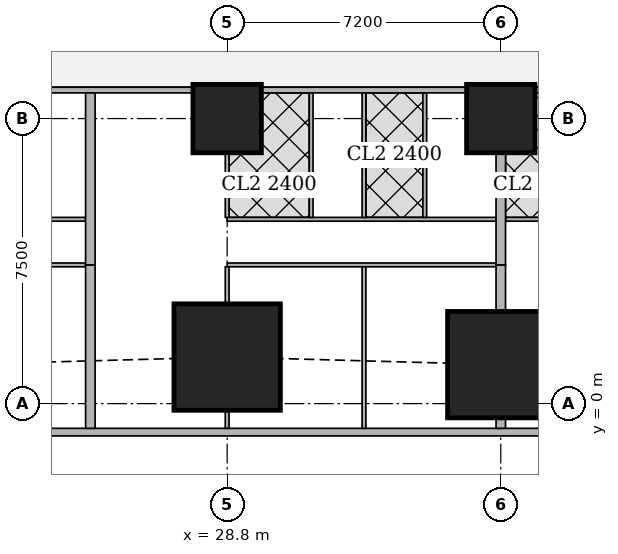
"""IFC4 building model, lengths in metres.
Left out: names, types, materials, properties, quantities, classifications, styles, units other than length and angle.
Written with IfcOpenShell. Run it as: python <this file> out.ifc"""

import sys

from ifc_helpers import new_model, si_unit, direction, frame, frame_2d, origin, origin_2d, place, context, subcontext, project, spatial, rectangle, extrude, element, fill, save


model = new_model("IFC4")
c1 = context("Model", 3, precision=1e-05, world=origin(), true_north=direction((0.0, 1.0)))
c2 = subcontext(c1, "Body", "Model", "MODEL_VIEW")
j1 = project(units=[si_unit("LENGTHUNIT", "METRE"), si_unit("PLANEANGLEUNIT", "RADIAN")], contexts=[c1])
p1 = place(None, origin())
s1 = spatial("IfcSite", under=j1, at=p1, CompositionType="ELEMENT")
p2 = place(p1, origin())
s2 = spatial("IfcBuilding", under=s1, at=p2, CompositionType="ELEMENT")
p3 = place(p2, frame((0.0, 0.0, 31.25)))
s3 = spatial("IfcBuildingStorey", under=s2, at=p3, CompositionType="ELEMENT", Elevation=31.25)
for number, where, z_axis, x_axis in (
    (1, (28.8, 1.225, 0.0), (0.0, 0.0, 1.0), (1.0, 0.0, 0.0)),
    (2, (36.0, 1.025, 0.0), (0.0, 0.0, 1.0), (1.0, 0.0, 0.0)),
):
    element("IfcColumn", number, at=place(p3, frame(where, z_axis=z_axis, x_axis=x_axis)), inside=s3, PredefinedType="COLUMN", context=c2, shape_type="SweptSolid", body=[
        extrude(rectangle(XDim=2.8, YDim=2.8, at=origin_2d()), origin(), (0.0, 0.0, 1.0), 3.75),
    ])
for number, where, z_axis, x_axis in (
    (3, (28.8, 7.5, 0.0), (0.0, 0.0, 1.0), (1.0, 0.0, 0.0)),
    (4, (36.0, 7.5, 0.0), (0.0, 0.0, 1.0), (1.0, 0.0, 0.0)),
):
    element("IfcColumn", number, at=place(p3, frame(where, z_axis=z_axis, x_axis=x_axis)), inside=s3, PredefinedType="COLUMN", context=c2, shape_type="SweptSolid", body=[
        extrude(rectangle(XDim=1.8, YDim=1.8, at=origin_2d()), origin(), (0.0, 0.0, 1.0), 3.75),
    ])
p4 = place(p3, frame((2.163, -0.75, 0.0), z_axis=(0.0, 0.0, 1.0), x_axis=(1.0, 0.0, 0.0)))
e5 = element("IfcWall", 5, at=p4, inside=s3, PredefinedType="SOLIDWALL", context=c2, shape_type="SweptSolid", body=[
    extrude(rectangle(XDim=45.628, YDim=0.2, at=frame_2d((22.814, 0.0))), origin(), (0.0, 0.0, 1.0), 3.5),
])
p5 = place(p4, frame((9.537, 0.0, 0.9)))
e6 = element("IfcOpeningElement", 6, at=p5, cuts=e5, PredefinedType="OPENING", context=c2, shape_type="SweptSolid", body=[
    extrude(rectangle(XDim=1.8, YDim=1.5, at=frame_2d((0.9, 0.75))), frame((0.0, 0.11, 0.0), z_axis=(0.0, -1.0, 0.0), x_axis=(1.0, 0.0, 0.0)), (0.0, 0.0, 1.0), 0.22),
])
p6 = place(p4, frame((13.137, 0.0, 0.9)))
e7 = element("IfcOpeningElement", 7, at=p6, cuts=e5, PredefinedType="OPENING", context=c2, shape_type="SweptSolid", body=[
    extrude(rectangle(XDim=1.8, YDim=1.5, at=frame_2d((0.9, 0.75))), frame((0.0, 0.11, 0.0), z_axis=(0.0, -1.0, 0.0), x_axis=(1.0, 0.0, 0.0)), (0.0, 0.0, 1.0), 0.22),
])
p7 = place(p4, frame((16.737, 0.0, 0.9)))
e8 = element("IfcOpeningElement", 8, at=p7, cuts=e5, PredefinedType="OPENING", context=c2, shape_type="SweptSolid", body=[
    extrude(rectangle(XDim=1.8, YDim=1.5, at=frame_2d((0.9, 0.75))), frame((0.0, 0.11, 0.0), z_axis=(0.0, -1.0, 0.0), x_axis=(1.0, 0.0, 0.0)), (0.0, 0.0, 1.0), 0.22),
])
p8 = place(p4, frame((20.337, 0.0, 0.9)))
e9 = element("IfcOpeningElement", 9, at=p8, cuts=e5, PredefinedType="OPENING", context=c2, shape_type="SweptSolid", body=[
    extrude(rectangle(XDim=1.8, YDim=1.5, at=frame_2d((0.9, 0.75))), frame((0.0, 0.11, 0.0), z_axis=(0.0, -1.0, 0.0), x_axis=(1.0, 0.0, 0.0)), (0.0, 0.0, 1.0), 0.22),
])
p9 = place(p4, frame((23.937, 0.0, 0.9)))
e10 = element("IfcOpeningElement", 10, at=p9, cuts=e5, PredefinedType="OPENING", context=c2, shape_type="SweptSolid", body=[
    extrude(rectangle(XDim=1.8, YDim=1.5, at=frame_2d((0.9, 0.75))), frame((0.0, 0.11, 0.0), z_axis=(0.0, -1.0, 0.0), x_axis=(1.0, 0.0, 0.0)), (0.0, 0.0, 1.0), 0.22),
])
p10 = place(p4, frame((27.537, 0.0, 0.9)))
e11 = element("IfcOpeningElement", 11, at=p10, cuts=e5, PredefinedType="OPENING", context=c2, shape_type="SweptSolid", body=[
    extrude(rectangle(XDim=1.8, YDim=1.5, at=frame_2d((0.9, 0.75))), frame((0.0, 0.11, 0.0), z_axis=(0.0, -1.0, 0.0), x_axis=(1.0, 0.0, 0.0)), (0.0, 0.0, 1.0), 0.22),
])
p11 = place(p4, frame((31.137, 0.0, 0.9)))
e12 = element("IfcOpeningElement", 12, at=p11, cuts=e5, PredefinedType="OPENING", context=c2, shape_type="SweptSolid", body=[
    extrude(rectangle(XDim=1.8, YDim=1.5, at=frame_2d((0.9, 0.75))), frame((0.0, 0.11, 0.0), z_axis=(0.0, -1.0, 0.0), x_axis=(1.0, 0.0, 0.0)), (0.0, 0.0, 1.0), 0.22),
])
p12 = place(p4, frame((34.737, 0.0, 0.9)))
e13 = element("IfcOpeningElement", 13, at=p12, cuts=e5, PredefinedType="OPENING", context=c2, shape_type="SweptSolid", body=[
    extrude(rectangle(XDim=1.8, YDim=1.5, at=frame_2d((0.9, 0.75))), frame((0.0, 0.11, 0.0), z_axis=(0.0, -1.0, 0.0), x_axis=(1.0, 0.0, 0.0)), (0.0, 0.0, 1.0), 0.22),
])
p13 = place(p3, frame((40.355, 8.25, 0.0), z_axis=(0.0, 0.0, 1.0), x_axis=(-1.0, 0.0, 0.0)))
e14 = element("IfcWall", 14, at=p13, inside=s3, PredefinedType="SOLIDWALL", context=c2, shape_type="SweptSolid", body=[
    extrude(rectangle(XDim=3.454, YDim=0.15, at=frame_2d((1.727, 0.0))), origin(), (0.0, 0.0, 1.0), 3.5),
])
p14 = place(p13, frame((0.15, 0.0, 0.0)))
e15 = element("IfcOpeningElement", 15, at=p14, cuts=e14, PredefinedType="OPENING", context=c2, shape_type="SweptSolid", body=[
    extrude(rectangle(XDim=1.0, YDim=2.1, at=frame_2d((0.5, 1.05))), frame((0.0, 0.085, 0.0), z_axis=(0.0, -1.0, 0.0), x_axis=(1.0, 0.0, 0.0)), (0.0, 0.0, 1.0), 0.17),
])
p15 = place(p3, frame((35.099, 8.25, 0.0), z_axis=(0.0, 0.0, 1.0), x_axis=(-1.0, 0.0, 0.0)))
e16 = element("IfcWall", 16, at=p15, inside=s3, PredefinedType="SOLIDWALL", context=c2, shape_type="SweptSolid", body=[
    extrude(rectangle(XDim=5.398, YDim=0.15, at=frame_2d((2.699, 0.0))), origin(), (0.0, 0.0, 1.0), 3.5),
])
p16 = place(p3, frame((27.899, 8.25, 0.0), z_axis=(0.0, 0.0, 1.0), x_axis=(-1.0, 0.0, 0.0)))
e17 = element("IfcWall", 17, at=p16, inside=s3, PredefinedType="SOLIDWALL", context=c2, shape_type="SweptSolid", body=[
    extrude(rectangle(XDim=5.398, YDim=0.15, at=frame_2d((2.699, 0.0))), origin(), (0.0, 0.0, 1.0), 3.5),
])
p17 = place(p16, frame((0.799, 0.0, 0.0)))
e18 = element("IfcOpeningElement", 18, at=p17, cuts=e17, PredefinedType="OPENING", context=c2, shape_type="SweptSolid", body=[
    extrude(rectangle(XDim=1.0, YDim=2.1, at=frame_2d((0.5, 1.05))), frame((0.0, 0.085, 0.0), z_axis=(0.0, -1.0, 0.0), x_axis=(1.0, 0.0, 0.0)), (0.0, 0.0, 1.0), 0.17),
])
p18 = place(p3, frame((35.094, 36.585, 0.0), z_axis=(0.0, 0.0, 1.0), x_axis=(0.185588860311, -0.982627485331, 0.0)))
e19 = element("IfcWall", 19, at=p18, inside=s3, PredefinedType="SOLIDWALL", context=c2, shape_type="SweptSolid", body=[
    extrude(rectangle(XDim=34.797, YDim=0.15, at=frame_2d((17.399, 0.0))), origin(), (0.0, 0.0, 1.0), 2.5),
])
p19 = place(p18, frame((6.012, 0.0, 0.0)))
e20 = element("IfcOpeningElement", 20, at=p19, cuts=e19, PredefinedType="OPENING", context=c2, shape_type="SweptSolid", body=[
    extrude(rectangle(XDim=1.0, YDim=2.1, at=frame_2d((0.5, 1.05))), frame((0.0, 0.085, 0.0), z_axis=(0.0, -1.0, 0.0), x_axis=(1.0, 0.0, 0.0)), (0.0, 0.0, 1.0), 0.17),
])
p20 = place(p18, frame((9.828, 0.0, 0.0)))
e21 = element("IfcOpeningElement", 21, at=p20, cuts=e19, PredefinedType="OPENING", context=c2, shape_type="SweptSolid", body=[
    extrude(rectangle(XDim=1.0, YDim=2.1, at=frame_2d((0.5, 1.05))), frame((0.0, 0.085, 0.0), z_axis=(0.0, -1.0, 0.0), x_axis=(1.0, 0.0, 0.0)), (0.0, 0.0, 1.0), 0.17),
])
p21 = place(p18, frame((25.9, 0.0, 0.0)))
e22 = element("IfcOpeningElement", 22, at=p21, cuts=e19, PredefinedType="OPENING", context=c2, shape_type="SweptSolid", body=[
    extrude(rectangle(XDim=1.0, YDim=2.1, at=frame_2d((0.5, 1.05))), frame((0.0, 0.085, 0.0), z_axis=(0.0, -1.0, 0.0), x_axis=(1.0, 0.0, 0.0)), (0.0, 0.0, 1.0), 0.17),
])
p22 = place(p3, frame((25.075, 3.65, 0.0), z_axis=(0.0, 0.0, 1.0), x_axis=(-1.0, 0.0, 0.0)))
e23 = element("IfcWall", 23, at=p22, inside=s3, PredefinedType="PARTITIONING", context=c2, shape_type="SweptSolid", body=[
    extrude(rectangle(XDim=7.075, YDim=0.1, at=frame_2d((3.538, 0.0))), origin(), (0.0, 0.0, 1.0), 3.5),
])
p23 = place(p22, frame((5.975, 0.0, 0.0)))
e24 = element("IfcOpeningElement", 24, at=p23, cuts=e23, PredefinedType="OPENING", context=c2, shape_type="SweptSolid", body=[
    extrude(rectangle(XDim=0.9, YDim=2.1, at=frame_2d((0.45, 1.05))), frame((0.0, 0.06, 0.0), z_axis=(0.0, -1.0, 0.0), x_axis=(1.0, 0.0, 0.0)), (0.0, 0.0, 1.0), 0.12),
])
p24 = place(p22, frame((1.15, 0.0, 0.0)))
e25 = element("IfcOpeningElement", 25, at=p24, cuts=e23, PredefinedType="OPENING", context=c2, shape_type="SweptSolid", body=[
    extrude(rectangle(XDim=0.9, YDim=2.1, at=frame_2d((0.45, 1.05))), frame((0.0, 0.06, 0.0), z_axis=(0.0, -1.0, 0.0), x_axis=(1.0, 0.0, 0.0)), (0.0, 0.0, 1.0), 0.12),
])
p25 = place(p3, frame((25.075, 4.85, 0.0), z_axis=(0.0, 0.0, 1.0), x_axis=(-1.0, 0.0, 0.0)))
e26 = element("IfcWall", 26, at=p25, inside=s3, PredefinedType="PARTITIONING", context=c2, shape_type="SweptSolid", body=[
    extrude(rectangle(XDim=7.075, YDim=0.1, at=frame_2d((3.538, 0.0))), origin(), (0.0, 0.0, 1.0), 3.5),
])
p26 = place(p25, frame((5.52, 0.0, 0.0)))
e27 = element("IfcOpeningElement", 27, at=p26, cuts=e26, PredefinedType="OPENING", context=c2, shape_type="SweptSolid", body=[
    extrude(rectangle(XDim=0.9, YDim=2.1, at=frame_2d((0.45, 1.05))), frame((0.0, 0.06, 0.0), z_axis=(0.0, -1.0, 0.0), x_axis=(1.0, 0.0, 0.0)), (0.0, 0.0, 1.0), 0.12),
])
p27 = place(p25, frame((2.225, 0.0, 0.0)))
e28 = element("IfcOpeningElement", 28, at=p27, cuts=e26, PredefinedType="OPENING", context=c2, shape_type="SweptSolid", body=[
    extrude(rectangle(XDim=0.9, YDim=2.1, at=frame_2d((0.45, 1.05))), frame((0.0, 0.06, 0.0), z_axis=(0.0, -1.0, 0.0), x_axis=(1.0, 0.0, 0.0)), (0.0, 0.0, 1.0), 0.12),
])
p28 = place(p25, frame((3.72, 0.0, 0.0)))
e29 = element("IfcOpeningElement", 29, at=p28, cuts=e26, PredefinedType="OPENING", context=c2, shape_type="SweptSolid", body=[
    extrude(rectangle(XDim=0.9, YDim=2.1, at=frame_2d((0.45, 1.05))), frame((0.0, 0.06, 0.0), z_axis=(0.0, -1.0, 0.0), x_axis=(1.0, 0.0, 0.0)), (0.0, 0.0, 1.0), 0.12),
])
p29 = place(p25, frame((0.425, 0.0, 0.0)))
e30 = element("IfcOpeningElement", 30, at=p29, cuts=e26, PredefinedType="OPENING", context=c2, shape_type="SweptSolid", body=[
    extrude(rectangle(XDim=0.9, YDim=2.1, at=frame_2d((0.45, 1.05))), frame((0.0, 0.06, 0.0), z_axis=(0.0, -1.0, 0.0), x_axis=(1.0, 0.0, 0.0)), (0.0, 0.0, 1.0), 0.12),
])
p30 = place(p3, frame((35.875, 3.65, 0.0), z_axis=(0.0, 0.0, 1.0), x_axis=(-1.0, 0.0, 0.0)))
e31 = element("IfcWall", 31, at=p30, inside=s3, PredefinedType="PARTITIONING", context=c2, shape_type="SweptSolid", body=[
    extrude(rectangle(XDim=7.075, YDim=0.1, at=frame_2d((3.538, 0.0))), origin(), (0.0, 0.0, 1.0), 3.5),
])
p31 = place(p30, frame((4.75, 0.0, 0.0)))
e32 = element("IfcOpeningElement", 32, at=p31, cuts=e31, PredefinedType="OPENING", context=c2, shape_type="SweptSolid", body=[
    extrude(rectangle(XDim=0.9, YDim=2.1, at=frame_2d((0.45, 1.05))), frame((0.0, 0.06, 0.0), z_axis=(0.0, -1.0, 0.0), x_axis=(1.0, 0.0, 0.0)), (0.0, 0.0, 1.0), 0.12),
])
p32 = place(p30, frame((2.375, 0.0, 0.0)))
e33 = element("IfcOpeningElement", 33, at=p32, cuts=e31, PredefinedType="OPENING", context=c2, shape_type="SweptSolid", body=[
    extrude(rectangle(XDim=0.9, YDim=2.1, at=frame_2d((0.45, 1.05))), frame((0.0, 0.06, 0.0), z_axis=(0.0, -1.0, 0.0), x_axis=(1.0, 0.0, 0.0)), (0.0, 0.0, 1.0), 0.12),
])
p33 = place(p3, frame((35.875, 4.85, 0.0), z_axis=(0.0, 0.0, 1.0), x_axis=(-1.0, 0.0, 0.0)))
e34 = element("IfcWall", 34, at=p33, inside=s3, PredefinedType="PARTITIONING", context=c2, shape_type="SweptSolid", body=[
    extrude(rectangle(XDim=7.075, YDim=0.1, at=frame_2d((3.538, 0.0))), origin(), (0.0, 0.0, 1.0), 3.5),
])
p34 = place(p33, frame((5.52, 0.0, 0.0)))
e35 = element("IfcOpeningElement", 35, at=p34, cuts=e34, PredefinedType="OPENING", context=c2, shape_type="SweptSolid", body=[
    extrude(rectangle(XDim=0.9, YDim=2.1, at=frame_2d((0.45, 1.05))), frame((0.0, 0.06, 0.0), z_axis=(0.0, -1.0, 0.0), x_axis=(1.0, 0.0, 0.0)), (0.0, 0.0, 1.0), 0.12),
])
p35 = place(p33, frame((2.225, 0.0, 0.0)))
e36 = element("IfcOpeningElement", 36, at=p35, cuts=e34, PredefinedType="OPENING", context=c2, shape_type="SweptSolid", body=[
    extrude(rectangle(XDim=0.9, YDim=2.1, at=frame_2d((0.45, 1.05))), frame((0.0, 0.06, 0.0), z_axis=(0.0, -1.0, 0.0), x_axis=(1.0, 0.0, 0.0)), (0.0, 0.0, 1.0), 0.12),
])
p36 = place(p33, frame((3.72, 0.0, 0.0)))
e37 = element("IfcOpeningElement", 37, at=p36, cuts=e34, PredefinedType="OPENING", context=c2, shape_type="SweptSolid", body=[
    extrude(rectangle(XDim=0.9, YDim=2.1, at=frame_2d((0.45, 1.05))), frame((0.0, 0.06, 0.0), z_axis=(0.0, -1.0, 0.0), x_axis=(1.0, 0.0, 0.0)), (0.0, 0.0, 1.0), 0.12),
])
p37 = place(p33, frame((0.425, 0.0, 0.0)))
e38 = element("IfcOpeningElement", 38, at=p37, cuts=e34, PredefinedType="OPENING", context=c2, shape_type="SweptSolid", body=[
    extrude(rectangle(XDim=0.9, YDim=2.1, at=frame_2d((0.45, 1.05))), frame((0.0, 0.06, 0.0), z_axis=(0.0, -1.0, 0.0), x_axis=(1.0, 0.0, 0.0)), (0.0, 0.0, 1.0), 0.12),
])
p38 = place(p3, frame((28.8, -0.65, 0.0), z_axis=(0.0, 0.0, 1.0), x_axis=(0.0, 1.0, 0.0)))
e39 = element("IfcWall", 39, at=p38, inside=s3, PredefinedType="PARTITIONING", context=c2, shape_type="SweptSolid", body=[
    extrude(rectangle(XDim=0.474, YDim=0.1, at=frame_2d((0.237, 0.0))), origin(), (0.0, 0.0, 1.0), 3.5),
])
p39 = place(p3, frame((28.8, 2.626, 0.0), z_axis=(0.0, 0.0, 1.0), x_axis=(0.0, 1.0, 0.0)))
e40 = element("IfcWall", 40, at=p39, inside=s3, PredefinedType="PARTITIONING", context=c2, shape_type="SweptSolid", body=[
    extrude(rectangle(XDim=0.974, YDim=0.1, at=frame_2d((0.487, 0.0))), origin(), (0.0, 0.0, 1.0), 3.5),
])
p40 = place(p3, frame((32.4, -0.65, 0.0), z_axis=(0.0, 0.0, 1.0), x_axis=(0.0, 1.0, 0.0)))
e41 = element("IfcWall", 41, at=p40, inside=s3, PredefinedType="PARTITIONING", context=c2, shape_type="SweptSolid", body=[
    extrude(rectangle(XDim=4.25, YDim=0.1, at=frame_2d((2.125, 0.0))), origin(), (0.0, 0.0, 1.0), 2.05),
])
p41 = place(p3, frame((28.8, 4.9, 0.0), z_axis=(0.0, 0.0, 1.0), x_axis=(0.0, 1.0, 0.0)))
e42 = element("IfcWall", 42, at=p41, inside=s3, PredefinedType="PARTITIONING", context=c2, shape_type="SweptSolid", body=[
    extrude(rectangle(XDim=1.699, YDim=0.1, at=frame_2d((0.85, 0.0))), origin(), (0.0, 0.0, 1.0), 3.5),
])
for number, where, z_axis, x_axis in (
    (43, (32.4, 4.9, 0.0), (0.0, 0.0, 1.0), (0.0, 1.0, 0.0)),
    (44, (31.01, 4.9, 0.0), (0.0, 0.0, 1.0), (0.0, 1.0, 0.0)),
    (45, (34.0, 4.9, 0.0), (0.0, 0.0, 1.0), (0.0, 1.0, 0.0)),
):
    element("IfcWall", number, at=place(p3, frame(where, z_axis=z_axis, x_axis=x_axis)), inside=s3, PredefinedType="PARTITIONING", context=c2, shape_type="SweptSolid", body=[
        extrude(rectangle(XDim=3.275, YDim=0.1, at=frame_2d((1.638, 0.0))), origin(), (0.0, 0.0, 1.0), 3.5),
    ])
p42 = place(p3, frame((25.2, -0.65, 0.0), z_axis=(0.0, 0.0, 1.0), x_axis=(0.0, 1.0, 0.0)))
e46 = element("IfcWall", 46, at=p42, inside=s3, PredefinedType="SOLIDWALL", context=c2, shape_type="SweptSolid", body=[
    extrude(rectangle(XDim=4.3, YDim=0.25, at=frame_2d((2.15, 0.0))), origin(), (0.0, 0.0, 1.0), 2.05),
])
p43 = place(p3, frame((25.2, 3.65, 0.0), z_axis=(0.0, 0.0, 1.0), x_axis=(0.0, 1.0, 0.0)))
e47 = element("IfcWall", 47, at=p43, inside=s3, PredefinedType="SOLIDWALL", context=c2, shape_type="SweptSolid", body=[
    extrude(rectangle(XDim=4.525, YDim=0.25, at=frame_2d((2.263, 0.0))), origin(), (0.0, 0.0, 1.0), 3.5),
])
p44 = place(p3, frame((38.029, 4.85, 0.0), z_axis=(0.0, 0.0, 1.0), x_axis=(-1.0, 0.0, 0.0)))
e48 = element("IfcWall", 48, at=p44, inside=s3, PredefinedType="PARTITIONING", context=c2, shape_type="SweptSolid", body=[
    extrude(rectangle(XDim=1.904, YDim=0.1, at=frame_2d((0.952, 0.0))), origin(), (0.0, 0.0, 1.0), 3.5),
])
p45 = place(p44, frame((0.579, 0.0, 0.0)))
e49 = element("IfcOpeningElement", 49, at=p45, cuts=e48, PredefinedType="OPENING", context=c2, shape_type="SweptSolid", body=[
    extrude(rectangle(XDim=0.9, YDim=2.1, at=frame_2d((0.45, 1.05))), frame((0.0, 0.06, 0.0), z_axis=(0.0, -1.0, 0.0), x_axis=(1.0, 0.0, 0.0)), (0.0, 0.0, 1.0), 0.12),
])
p46 = place(p3, frame((36.0, -0.65, 0.0), z_axis=(0.0, 0.0, 1.0), x_axis=(0.0, 1.0, 0.0)))
e50 = element("IfcWall", 50, at=p46, inside=s3, PredefinedType="SOLIDWALL", context=c2, shape_type="SweptSolid", body=[
    extrude(rectangle(XDim=0.274, YDim=0.25, at=frame_2d((0.137, 0.0))), origin(), (0.0, 0.0, 1.0), 3.5),
])
p47 = place(p3, frame((36.0, 2.426, 0.0), z_axis=(0.0, 0.0, 1.0), x_axis=(0.0, 1.0, 0.0)))
e51 = element("IfcWall", 51, at=p47, inside=s3, PredefinedType="SOLIDWALL", context=c2, shape_type="SweptSolid", body=[
    extrude(rectangle(XDim=1.224, YDim=0.25, at=frame_2d((0.612, 0.0))), origin(), (0.0, 0.0, 1.0), 3.5),
])
p48 = place(p3, frame((36.0, 3.65, 0.0), z_axis=(0.0, 0.0, 1.0), x_axis=(0.0, 1.0, 0.0)))
e52 = element("IfcWall", 52, at=p48, inside=s3, PredefinedType="SOLIDWALL", context=c2, shape_type="SweptSolid", body=[
    extrude(rectangle(XDim=2.949, YDim=0.25, at=frame_2d((1.475, 0.0))), origin(), (0.0, 0.0, 1.0), 3.5),
])
p49 = place(p8, origin())
e53 = element("IfcWindow", 53, at=p49, inside=s3, PartitioningType="SINGLE_PANEL", PredefinedType="WINDOW", context=c2, shape_type="SweptSolid", body=[
    extrude(rectangle(XDim=1.8, YDim=1.5, at=frame_2d((0.9, 0.75))), frame((0.0, 0.03, 0.0), z_axis=(0.0, -1.0, 0.0), x_axis=(1.0, 0.0, 0.0)), (0.0, 0.0, 1.0), 0.06),
])
fill(e9, e53)
p50 = place(p9, origin())
e54 = element("IfcWindow", 54, at=p50, inside=s3, PartitioningType="SINGLE_PANEL", PredefinedType="WINDOW", context=c2, shape_type="SweptSolid", body=[
    extrude(rectangle(XDim=1.8, YDim=1.5, at=frame_2d((0.9, 0.75))), frame((0.0, 0.03, 0.0), z_axis=(0.0, -1.0, 0.0), x_axis=(1.0, 0.0, 0.0)), (0.0, 0.0, 1.0), 0.06),
])
fill(e10, e54)
p51 = place(p10, origin())
e55 = element("IfcWindow", 55, at=p51, inside=s3, PartitioningType="SINGLE_PANEL", PredefinedType="WINDOW", context=c2, shape_type="SweptSolid", body=[
    extrude(rectangle(XDim=1.8, YDim=1.5, at=frame_2d((0.9, 0.75))), frame((0.0, 0.03, 0.0), z_axis=(0.0, -1.0, 0.0), x_axis=(1.0, 0.0, 0.0)), (0.0, 0.0, 1.0), 0.06),
])
fill(e11, e55)
p52 = place(p11, origin())
e56 = element("IfcWindow", 56, at=p52, inside=s3, PartitioningType="SINGLE_PANEL", PredefinedType="WINDOW", context=c2, shape_type="SweptSolid", body=[
    extrude(rectangle(XDim=1.8, YDim=1.5, at=frame_2d((0.9, 0.75))), frame((0.0, 0.03, 0.0), z_axis=(0.0, -1.0, 0.0), x_axis=(1.0, 0.0, 0.0)), (0.0, 0.0, 1.0), 0.06),
])
fill(e12, e56)
p53 = place(p12, origin())
e57 = element("IfcWindow", 57, at=p53, inside=s3, PartitioningType="SINGLE_PANEL", PredefinedType="WINDOW", context=c2, shape_type="SweptSolid", body=[
    extrude(rectangle(XDim=1.8, YDim=1.5, at=frame_2d((0.9, 0.75))), frame((0.0, 0.03, 0.0), z_axis=(0.0, -1.0, 0.0), x_axis=(1.0, 0.0, 0.0)), (0.0, 0.0, 1.0), 0.06),
])
fill(e13, e57)
p54 = place(p29, origin())
e58 = element("IfcDoor", 58, at=p54, inside=s3, OperationType="SINGLE_SWING_RIGHT", PredefinedType="DOOR", context=c2, shape_type="SweptSolid", body=[
    extrude(rectangle(XDim=0.9, YDim=2.1, at=frame_2d((0.45, 1.05))), frame((0.0, 0.025, 0.0), z_axis=(0.0, -1.0, 0.0), x_axis=(1.0, 0.0, 0.0)), (0.0, 0.0, 1.0), 0.05),
])
fill(e30, e58)
p55 = place(p31, origin())
e59 = element("IfcDoor", 59, at=p55, inside=s3, OperationType="SINGLE_SWING_RIGHT", PredefinedType="DOOR", context=c2, shape_type="SweptSolid", body=[
    extrude(rectangle(XDim=0.9, YDim=2.1, at=frame_2d((0.45, 1.05))), frame((0.0, 0.025, 0.0), z_axis=(0.0, -1.0, 0.0), x_axis=(1.0, 0.0, 0.0)), (0.0, 0.0, 1.0), 0.05),
])
fill(e32, e59)
p56 = place(p32, origin())
e60 = element("IfcDoor", 60, at=p56, inside=s3, OperationType="SINGLE_SWING_RIGHT", PredefinedType="DOOR", context=c2, shape_type="SweptSolid", body=[
    extrude(rectangle(XDim=0.9, YDim=2.1, at=frame_2d((0.45, 1.05))), frame((0.0, 0.025, 0.0), z_axis=(0.0, -1.0, 0.0), x_axis=(1.0, 0.0, 0.0)), (0.0, 0.0, 1.0), 0.05),
])
fill(e33, e60)
p57 = place(p34, origin())
e61 = element("IfcDoor", 61, at=p57, inside=s3, OperationType="SINGLE_SWING_LEFT", PredefinedType="DOOR", context=c2, shape_type="SweptSolid", body=[
    extrude(rectangle(XDim=0.9, YDim=2.1, at=frame_2d((0.45, 1.05))), frame((0.0, 0.025, 0.0), z_axis=(0.0, -1.0, 0.0), x_axis=(1.0, 0.0, 0.0)), (0.0, 0.0, 1.0), 0.05),
])
fill(e35, e61)
p58 = place(p35, origin())
e62 = element("IfcDoor", 62, at=p58, inside=s3, OperationType="SINGLE_SWING_RIGHT", PredefinedType="DOOR", context=c2, shape_type="SweptSolid", body=[
    extrude(rectangle(XDim=0.9, YDim=2.1, at=frame_2d((0.45, 1.05))), frame((0.0, 0.025, 0.0), z_axis=(0.0, -1.0, 0.0), x_axis=(1.0, 0.0, 0.0)), (0.0, 0.0, 1.0), 0.05),
])
fill(e36, e62)
p59 = place(p36, origin())
e63 = element("IfcDoor", 63, at=p59, inside=s3, OperationType="SINGLE_SWING_RIGHT", PredefinedType="DOOR", context=c2, shape_type="SweptSolid", body=[
    extrude(rectangle(XDim=0.9, YDim=2.1, at=frame_2d((0.45, 1.05))), frame((0.0, 0.025, 0.0), z_axis=(0.0, -1.0, 0.0), x_axis=(1.0, 0.0, 0.0)), (0.0, 0.0, 1.0), 0.05),
])
fill(e37, e63)
p60 = place(p37, origin())
e64 = element("IfcDoor", 64, at=p60, inside=s3, OperationType="SINGLE_SWING_RIGHT", PredefinedType="DOOR", context=c2, shape_type="SweptSolid", body=[
    extrude(rectangle(XDim=0.9, YDim=2.1, at=frame_2d((0.45, 1.05))), frame((0.0, 0.025, 0.0), z_axis=(0.0, -1.0, 0.0), x_axis=(1.0, 0.0, 0.0)), (0.0, 0.0, 1.0), 0.05),
])
fill(e38, e64)
p61 = place(p17, origin())
e65 = element("IfcDoor", 65, at=p61, inside=s3, OperationType="SINGLE_SWING_LEFT", PredefinedType="DOOR", context=c2, shape_type="SweptSolid", body=[
    extrude(rectangle(XDim=1.0, YDim=2.1, at=frame_2d((0.5, 1.05))), frame((0.0, 0.025, 0.0), z_axis=(0.0, -1.0, 0.0), x_axis=(1.0, 0.0, 0.0)), (0.0, 0.0, 1.0), 0.05),
])
fill(e18, e65)
p62 = place(p45, origin())
e66 = element("IfcDoor", 66, at=p62, inside=s3, OperationType="SINGLE_SWING_LEFT", PredefinedType="DOOR", context=c2, shape_type="SweptSolid", body=[
    extrude(rectangle(XDim=0.9, YDim=2.1, at=frame_2d((0.45, 1.05))), frame((0.0, 0.025, 0.0), z_axis=(0.0, -1.0, 0.0), x_axis=(1.0, 0.0, 0.0)), (0.0, 0.0, 1.0), 0.05),
])
fill(e49, e66)
save(model, sys.argv[1])
